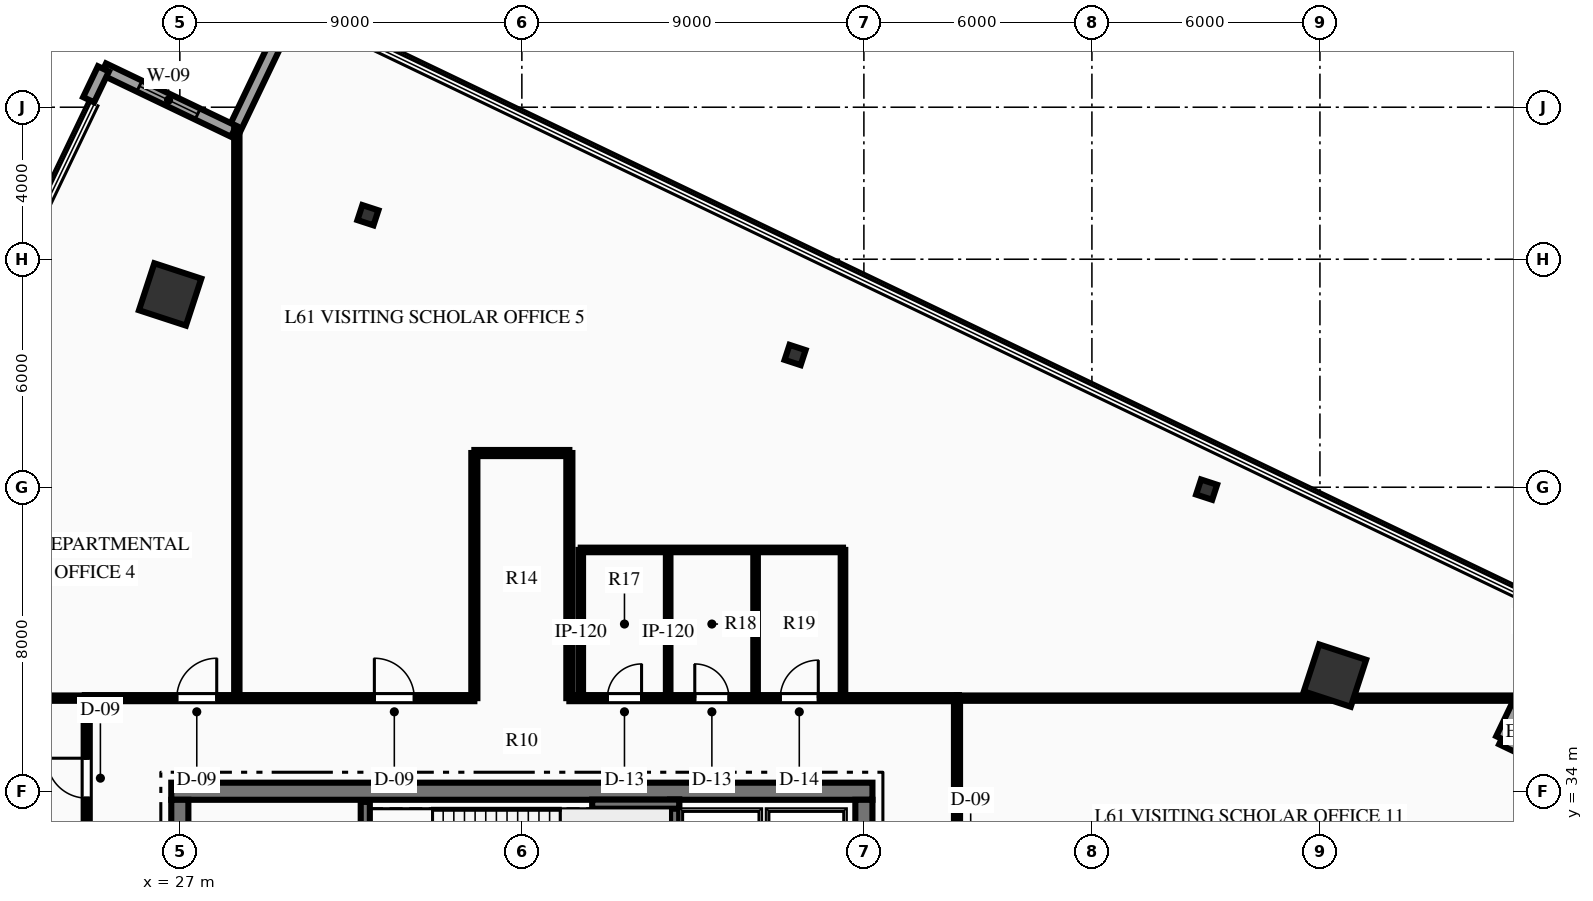
"""IFC4 building model, lengths in metres.
Left out: names, types, materials, properties, quantities, classifications, styles, units other than length and angle.
Written with IfcOpenShell. Run it as: python <this file> out.ifc"""

import sys

from ifc_helpers import new_model, si_unit, direction, frame, frame_2d, origin, origin_2d, place, context, subcontext, project, spatial, rectangle, hollow_rectangle, i_section, extrude, element, fill, save


model = new_model("IFC4")
c1 = context("Model", 3, precision=1e-05, world=origin(), true_north=direction((0.0, 1.0)))
c2 = subcontext(c1, "Body", "Model", "MODEL_VIEW")
j1 = project(units=[si_unit("LENGTHUNIT", "METRE"), si_unit("PLANEANGLEUNIT", "RADIAN")], contexts=[c1])
p1 = place(None, origin())
s1 = spatial("IfcSite", under=j1, at=p1, CompositionType="ELEMENT")
p2 = place(p1, origin())
s2 = spatial("IfcBuilding", under=s1, at=p2, CompositionType="ELEMENT")
p3 = place(p2, frame((0.0, 0.0, 244.2)))
s3 = spatial("IfcBuildingStorey", under=s2, at=p3, CompositionType="ELEMENT", Elevation=244.2)
p4 = place(p3, frame((26.775, 34.0, 0.0), z_axis=(0.0, 0.0, 1.0), x_axis=(1.0, 0.0, 0.0)))
e1 = element("IfcWall", 1, at=p4, inside=s3, PredefinedType="SHEAR", context=c2, shape_type="SweptSolid", body=[
    extrude(rectangle(XDim=18.45, YDim=0.45, at=frame_2d((9.225, 0.0))), origin(), (0.0, 0.0, 1.0), 4.5),
])
p5 = place(p3, frame((27.0, 18.225, 0.0), z_axis=(0.0, 0.0, 1.0), x_axis=(0.0, 1.0, 0.0)))
e2 = element("IfcWall", 2, at=p5, inside=s3, PredefinedType="SHEAR", context=c2, shape_type="SweptSolid", body=[
    extrude(rectangle(XDim=15.55, YDim=0.45, at=frame_2d((7.775, 0.0))), origin(), (0.0, 0.0, 1.0), 4.5),
])
p6 = place(p5, frame((10.015, 0.0, 0.0)))
e3 = element("IfcOpeningElement", 3, at=p6, cuts=e2, PredefinedType="OPENING", context=c2, shape_type="SweptSolid", body=[
    extrude(rectangle(XDim=1.4, YDim=2.2, at=frame_2d((0.7, 1.1))), frame((0.0, 0.235, 0.0), z_axis=(0.0, -1.0, 0.0), x_axis=(1.0, 0.0, 0.0)), (0.0, 0.0, 1.0), 0.47),
])
p7 = place(p3, frame((45.0, 18.225, 0.0), z_axis=(0.0, 0.0, 1.0), x_axis=(0.0, 1.0, 0.0)))
e4 = element("IfcWall", 4, at=p7, inside=s3, PredefinedType="SHEAR", context=c2, shape_type="SweptSolid", body=[
    extrude(rectangle(XDim=15.55, YDim=0.45, at=frame_2d((7.775, 0.0))), origin(), (0.0, 0.0, 1.0), 4.5),
])
p8 = place(p7, frame((10.015, 0.0, 0.0)))
e5 = element("IfcOpeningElement", 5, at=p8, cuts=e4, PredefinedType="OPENING", context=c2, shape_type="SweptSolid", body=[
    extrude(rectangle(XDim=1.4, YDim=2.2, at=frame_2d((0.7, 1.1))), frame((0.0, 0.235, 0.0), z_axis=(0.0, -1.0, 0.0), x_axis=(1.0, 0.0, 0.0)), (0.0, 0.0, 1.0), 0.47),
])
p9 = place(p3, frame((31.88, 29.93, 0.0), z_axis=(0.0, 0.0, 1.0), x_axis=(0.0, 1.0, 0.0)))
e6 = element("IfcWall", 6, at=p9, inside=s3, PredefinedType="SHEAR", context=c2, shape_type="SweptSolid", body=[
    extrude(rectangle(XDim=3.79, YDim=0.24, at=frame_2d((1.895, 0.0))), origin(), (0.0, 0.0, 1.0), 4.5),
])
p10 = place(p3, frame((40.02, 29.93, 0.0), z_axis=(0.0, 0.0, 1.0), x_axis=(0.0, 1.0, 0.0)))
e7 = element("IfcWall", 7, at=p10, inside=s3, PredefinedType="SHEAR", context=c2, shape_type="SweptSolid", body=[
    extrude(rectangle(XDim=3.85, YDim=0.24, at=frame_2d((1.925, 0.0))), origin(), (0.0, 0.0, 1.0), 4.5),
])
p11 = place(p3, frame((37.85, 33.66, 0.0), z_axis=(0.0, 0.0, 1.0), x_axis=(1.0, 0.0, 0.0)))
e8 = element("IfcWall", 8, at=p11, inside=s3, PredefinedType="SHEAR", context=c2, shape_type="SweptSolid", body=[
    extrude(rectangle(XDim=2.29, YDim=0.24, at=frame_2d((1.145, 0.0))), origin(), (0.0, 0.0, 1.0), 4.5),
])
for number, where, z_axis, x_axis in (
    (9, (57.396, 37.043, 0.0), (0.0, 0.0, 1.0), (0.311, 0.95, 0.0)),
    (10, (26.745, 47.073, 0.0), (0.0, 0.0, 1.0), (0.311, 0.95, 0.0)),
):
    element("IfcColumn", number, at=place(p3, frame(where, z_axis=z_axis, x_axis=x_axis)), inside=s3, PredefinedType="COLUMN", context=c2, shape_type="SweptSolid", body=[
        extrude(hollow_rectangle(XDim=1.3, YDim=1.3, WallThickness=0.06, at=origin_2d()), origin(), (0.0, 0.0, 1.0), 4.5),
    ])
for number, where, z_axis, x_axis in (
    (11, (54.018, 41.937, 0.0), (0.0, 0.0, 1.0), (0.311, 0.95, 0.0)),
    (12, (43.19, 45.48, 0.0), (0.0, 0.0, 1.0), (0.311, 0.95, 0.0)),
    (13, (31.949, 49.158, 0.0), (0.0, 0.0, 1.0), (0.311, 0.95, 0.0)),
):
    element("IfcColumn", number, at=place(p3, frame(where, z_axis=z_axis, x_axis=x_axis)), inside=s3, PredefinedType="COLUMN", context=c2, shape_type="SweptSolid", body=[
        extrude(i_section(OverallWidth=0.416, OverallDepth=0.445, WebThickness=0.039, FlangeThickness=0.063, at=origin_2d()), origin(), (0.0, 0.0, 1.0), 4.5),
    ])
p12 = place(p3, frame((61.784, 35.38, 0.0), z_axis=(0.0, 0.0, 1.0), x_axis=(0.901805596144, -0.432141952099, 0.0)))
e14 = element("IfcWall", 14, at=p12, inside=s3, PredefinedType="STANDARD", context=c2, shape_type="SweptSolid", body=[
    extrude(rectangle(XDim=3.8, YDim=0.32, at=frame_2d((1.9, 0.0))), origin(), (0.0, 0.0, 1.0), 4.23),
])
for number, where, z_axis, x_axis in (
    (15, (63.426, 38.807, 0.0), (0.0, 0.0, 1.0), (-0.432, -0.902, 0.0)),
    (16, (28.416, 51.367, 0.0), (0.0, 0.0, 1.0), (0.432, 0.902, 0.0)),
):
    element("IfcWall", number, at=place(p3, frame(where, z_axis=z_axis, x_axis=x_axis)), inside=s3, PredefinedType="STANDARD", context=c2, shape_type="SweptSolid", body=[
        extrude(rectangle(XDim=3.8, YDim=0.32, at=frame_2d((1.9, 0.0))), origin(), (0.0, 0.0, 1.0), 4.23),
    ])
p13 = place(p3, frame((24.989, 53.009, 0.0), z_axis=(0.0, 0.0, 1.0), x_axis=(0.901817593476, -0.432116914848, 0.0)))
e17 = element("IfcWall", 17, at=p13, inside=s3, PredefinedType="STANDARD", context=c2, shape_type="SweptSolid", body=[
    extrude(rectangle(XDim=3.8, YDim=0.32, at=frame_2d((1.9, 0.0))), origin(), (0.0, 0.0, 1.0), 4.23),
])
p14 = place(p13, frame((1.05, 0.0, 0.75)))
e18 = element("IfcOpeningElement", 18, at=p14, cuts=e17, PredefinedType="OPENING", context=c2, shape_type="SweptSolid", body=[
    extrude(rectangle(XDim=1.7, YDim=2.5, at=frame_2d((0.85, 1.25))), frame((0.0, 0.17, 0.0), z_axis=(0.0, -1.0, 0.0), x_axis=(1.0, 0.0, 0.0)), (0.0, 0.0, 1.0), 0.34),
])
p15 = place(p3, frame((24.6, 52.198, 0.0), z_axis=(0.0, 0.0, 1.0), x_axis=(0.432175339096, 0.901789596457, 0.0)))
e19 = element("IfcWall", 19, at=p15, inside=s3, PredefinedType="STANDARD", context=c2, shape_type="SweptSolid", body=[
    extrude(rectangle(XDim=0.9, YDim=0.32, at=frame_2d((0.45, 0.0))), origin(), (0.0, 0.0, 1.0), 4.23),
])
p16 = place(p3, frame((24.5, 36.45, 0.0), z_axis=(0.0, 0.0, 1.0), x_axis=(1.0, 0.0, 0.0)))
e20 = element("IfcWall", 20, at=p16, inside=s3, PredefinedType="PARTITIONING", context=c2, shape_type="SweptSolid", body=[
    extrude(rectangle(XDim=10.25, YDim=0.16, at=frame_2d((5.125, 0.0))), origin(), (0.0, 0.0, 1.0), 4.23),
])
p17 = place(p16, frame((2.421, 0.0, 0.0)))
e21 = element("IfcOpeningElement", 21, at=p17, cuts=e20, PredefinedType="OPENING", context=c2, shape_type="SweptSolid", body=[
    extrude(rectangle(XDim=1.05, YDim=2.15, at=frame_2d((0.525, 1.075))), frame((0.0, 0.09, 0.0), z_axis=(0.0, -1.0, 0.0), x_axis=(1.0, 0.0, 0.0)), (0.0, 0.0, 1.0), 0.18),
])
p18 = place(p16, frame((7.619, 0.0, 0.0)))
e22 = element("IfcOpeningElement", 22, at=p18, cuts=e20, PredefinedType="OPENING", context=c2, shape_type="SweptSolid", body=[
    extrude(rectangle(XDim=1.05, YDim=2.15, at=frame_2d((0.525, 1.075))), frame((0.0, 0.09, 0.0), z_axis=(0.0, -1.0, 0.0), x_axis=(1.0, 0.0, 0.0)), (0.0, 0.0, 1.0), 0.18),
])
p19 = place(p3, frame((37.25, 36.45, 0.0), z_axis=(0.0, 0.0, 1.0), x_axis=(1.0, 0.0, 0.0)))
e23 = element("IfcWall", 23, at=p19, inside=s3, PredefinedType="PARTITIONING", context=c2, shape_type="SweptSolid", body=[
    extrude(rectangle(XDim=10.25, YDim=0.16, at=frame_2d((5.125, 0.0))), origin(), (0.0, 0.0, 1.0), 4.23),
])
p20 = place(p19, frame((1.0, 0.0, 0.0)))
e24 = element("IfcOpeningElement", 24, at=p20, cuts=e23, PredefinedType="OPENING", context=c2, shape_type="SweptSolid", body=[
    extrude(rectangle(XDim=0.9, YDim=2.15, at=frame_2d((0.45, 1.075))), frame((0.0, 0.09, 0.0), z_axis=(0.0, -1.0, 0.0), x_axis=(1.0, 0.0, 0.0)), (0.0, 0.0, 1.0), 0.18),
])
p21 = place(p19, frame((3.3, 0.0, 0.0)))
e25 = element("IfcOpeningElement", 25, at=p21, cuts=e23, PredefinedType="OPENING", context=c2, shape_type="SweptSolid", body=[
    extrude(rectangle(XDim=0.9, YDim=2.15, at=frame_2d((0.45, 1.075))), frame((0.0, 0.09, 0.0), z_axis=(0.0, -1.0, 0.0), x_axis=(1.0, 0.0, 0.0)), (0.0, 0.0, 1.0), 0.18),
])
p22 = place(p19, frame((5.55, 0.0, 0.0)))
e26 = element("IfcOpeningElement", 26, at=p22, cuts=e23, PredefinedType="OPENING", context=c2, shape_type="SweptSolid", body=[
    extrude(rectangle(XDim=1.0, YDim=2.15, at=frame_2d((0.5, 1.075))), frame((0.0, 0.09, 0.0), z_axis=(0.0, -1.0, 0.0), x_axis=(1.0, 0.0, 0.0)), (0.0, 0.0, 1.0), 0.18),
])
p23 = place(p3, frame((24.55, 27.25, 0.0), z_axis=(0.0, 0.0, 1.0), x_axis=(0.0, 1.0, 0.0)))
e27 = element("IfcWall", 27, at=p23, inside=s3, PredefinedType="PARTITIONING", context=c2, shape_type="SweptSolid", body=[
    extrude(rectangle(XDim=9.2, YDim=0.16, at=frame_2d((4.6, 0.0))), origin(), (0.0, 0.0, 1.0), 4.23),
])
p24 = place(p23, frame((6.569, 0.0, 0.0)))
e28 = element("IfcOpeningElement", 28, at=p24, cuts=e27, PredefinedType="OPENING", context=c2, shape_type="SweptSolid", body=[
    extrude(rectangle(XDim=1.05, YDim=2.15, at=frame_2d((0.525, 1.075))), frame((0.0, 0.09, 0.0), z_axis=(0.0, -1.0, 0.0), x_axis=(1.0, 0.0, 0.0)), (0.0, 0.0, 1.0), 0.18),
])
p25 = place(p3, frame((47.45, 27.25, 0.0), z_axis=(0.0, 0.0, 1.0), x_axis=(0.0, 1.0, 0.0)))
e29 = element("IfcWall", 29, at=p25, inside=s3, PredefinedType="PARTITIONING", context=c2, shape_type="SweptSolid", body=[
    extrude(rectangle(XDim=9.2, YDim=0.16, at=frame_2d((4.6, 0.0))), origin(), (0.0, 0.0, 1.0), 4.23),
])
p26 = place(p25, frame((4.199, 0.0, 0.0)))
e30 = element("IfcOpeningElement", 30, at=p26, cuts=e29, PredefinedType="OPENING", context=c2, shape_type="SweptSolid", body=[
    extrude(rectangle(XDim=1.05, YDim=2.15, at=frame_2d((0.525, 1.075))), frame((0.0, 0.09, 0.0), z_axis=(0.0, -1.0, 0.0), x_axis=(1.0, 0.0, 0.0)), (0.0, 0.0, 1.0), 0.18),
])
for number, where, z_axis, x_axis in (
    (31, (34.75, 36.45, 0.0), (0.0, 0.0, 1.0), (0.0, 1.0, 0.0)),
    (32, (37.25, 36.45, 0.0), (0.0, 0.0, 1.0), (0.0, 1.0, 0.0)),
):
    element("IfcWall", number, at=place(p3, frame(where, z_axis=z_axis, x_axis=x_axis)), inside=s3, PredefinedType="PARTITIONING", context=c2, shape_type="SweptSolid", body=[
        extrude(rectangle(XDim=6.45, YDim=0.16, at=frame_2d((3.225, 0.0))), origin(), (0.0, 0.0, 1.0), 4.23),
    ])
p27 = place(p3, frame((34.75, 42.9, 0.0), z_axis=(0.0, 0.0, 1.0), x_axis=(1.0, 0.0, 0.0)))
e33 = element("IfcWall", 33, at=p27, inside=s3, PredefinedType="PARTITIONING", context=c2, shape_type="SweptSolid", body=[
    extrude(rectangle(XDim=2.5, YDim=0.16, at=frame_2d((1.25, 0.0))), origin(), (0.0, 0.0, 1.0), 4.23),
])
for number, where, z_axis, x_axis in (
    (34, (37.55, 36.45, 0.0), (0.0, 0.0, 1.0), (0.0, 1.0, 0.0)),
    (35, (39.85, 36.45, 0.0), (0.0, 0.0, 1.0), (0.0, 1.0, 0.0)),
    (36, (42.15, 36.45, 0.0), (0.0, 0.0, 1.0), (0.0, 1.0, 0.0)),
    (37, (44.45, 36.45, 0.0), (0.0, 0.0, 1.0), (0.0, 1.0, 0.0)),
):
    element("IfcWall", number, at=place(p3, frame(where, z_axis=z_axis, x_axis=x_axis)), inside=s3, PredefinedType="PARTITIONING", context=c2, shape_type="SweptSolid", body=[
        extrude(rectangle(XDim=3.9, YDim=0.12, at=frame_2d((1.95, 0.0))), origin(), (0.0, 0.0, 1.0), 4.23),
    ])
p28 = place(p3, frame((37.55, 40.35, 0.0), z_axis=(0.0, 0.0, 1.0), x_axis=(1.0, 0.0, 0.0)))
e38 = element("IfcWall", 38, at=p28, inside=s3, PredefinedType="PARTITIONING", context=c2, shape_type="SweptSolid", body=[
    extrude(rectangle(XDim=6.9, YDim=0.12, at=frame_2d((3.45, 0.0))), origin(), (0.0, 0.0, 1.0), 4.23),
])
p29 = place(p3, frame((17.1, 36.45, 0.0), z_axis=(0.0, 0.0, 1.0), x_axis=(1.0, 0.0, 0.0)))
e39 = element("IfcWall", 39, at=p29, inside=s3, PredefinedType="PARTITIONING", context=c2, shape_type="SweptSolid", body=[
    extrude(rectangle(XDim=7.45, YDim=0.14, at=frame_2d((3.725, 0.0))), origin(), (0.0, 0.0, 1.0), 4.23),
])
p30 = place(p3, frame((47.45, 36.45, 0.0), z_axis=(0.0, 0.0, 1.0), x_axis=(1.0, 0.0, 0.0)))
e40 = element("IfcWall", 40, at=p30, inside=s3, PredefinedType="PARTITIONING", context=c2, shape_type="SweptSolid", body=[
    extrude(rectangle(XDim=14.802, YDim=0.14, at=frame_2d((7.401, 0.0))), origin(), (0.0, 0.0, 1.0), 3.608),
])
p31 = place(p3, frame((28.5, 36.45, 0.0), z_axis=(0.0, 0.0, 1.0), x_axis=(0.0, 1.0, 0.0)))
e41 = element("IfcWall", 41, at=p31, inside=s3, PredefinedType="PARTITIONING", context=c2, shape_type="SweptSolid", body=[
    extrude(rectangle(XDim=14.999, YDim=0.14, at=frame_2d((7.5, 0.0))), origin(), (0.0, 0.0, 1.0), 4.23),
])
p32 = place(p14, origin())
e42 = element("IfcWindow", 42, at=p32, inside=s3, PartitioningType="SINGLE_PANEL", PredefinedType="WINDOW", context=c2, shape_type="SweptSolid", body=[
    extrude(rectangle(XDim=1.7, YDim=2.5, at=frame_2d((0.85, 1.25))), frame((0.0, 0.03, 0.0), z_axis=(0.0, -1.0, 0.0), x_axis=(1.0, 0.0, 0.0)), (0.0, 0.0, 1.0), 0.06),
])
fill(e18, e42)
p33 = place(p20, origin())
e43 = element("IfcDoor", 43, at=p33, inside=s3, OperationType="SINGLE_SWING_RIGHT", PredefinedType="DOOR", context=c2, shape_type="SweptSolid", body=[
    extrude(rectangle(XDim=0.9, YDim=2.15, at=frame_2d((0.45, 1.075))), frame((0.0, 0.025, 0.0), z_axis=(0.0, -1.0, 0.0), x_axis=(1.0, 0.0, 0.0)), (0.0, 0.0, 1.0), 0.05),
])
fill(e24, e43)
p34 = place(p21, origin())
e44 = element("IfcDoor", 44, at=p34, inside=s3, OperationType="SINGLE_SWING_LEFT", PredefinedType="DOOR", context=c2, shape_type="SweptSolid", body=[
    extrude(rectangle(XDim=0.9, YDim=2.15, at=frame_2d((0.45, 1.075))), frame((0.0, 0.025, 0.0), z_axis=(0.0, -1.0, 0.0), x_axis=(1.0, 0.0, 0.0)), (0.0, 0.0, 1.0), 0.05),
])
fill(e25, e44)
p35 = place(p22, origin())
e45 = element("IfcDoor", 45, at=p35, inside=s3, OperationType="SINGLE_SWING_RIGHT", PredefinedType="DOOR", context=c2, shape_type="SweptSolid", body=[
    extrude(rectangle(XDim=1.0, YDim=2.15, at=frame_2d((0.5, 1.075))), frame((0.0, 0.025, 0.0), z_axis=(0.0, -1.0, 0.0), x_axis=(1.0, 0.0, 0.0)), (0.0, 0.0, 1.0), 0.05),
])
fill(e26, e45)
p36 = place(p17, origin())
e46 = element("IfcDoor", 46, at=p36, inside=s3, OperationType="SINGLE_SWING_RIGHT", PredefinedType="DOOR", context=c2, shape_type="SweptSolid", body=[
    extrude(rectangle(XDim=1.05, YDim=2.15, at=frame_2d((0.525, 1.075))), frame((0.0, 0.025, 0.0), z_axis=(0.0, -1.0, 0.0), x_axis=(1.0, 0.0, 0.0)), (0.0, 0.0, 1.0), 0.05),
])
fill(e21, e46)
p37 = place(p18, origin())
e47 = element("IfcDoor", 47, at=p37, inside=s3, OperationType="SINGLE_SWING_LEFT", PredefinedType="DOOR", context=c2, shape_type="SweptSolid", body=[
    extrude(rectangle(XDim=1.05, YDim=2.15, at=frame_2d((0.525, 1.075))), frame((0.0, 0.025, 0.0), z_axis=(0.0, -1.0, 0.0), x_axis=(1.0, 0.0, 0.0)), (0.0, 0.0, 1.0), 0.05),
])
fill(e22, e47)
p38 = place(p24, origin())
e48 = element("IfcDoor", 48, at=p38, inside=s3, OperationType="SINGLE_SWING_RIGHT", PredefinedType="DOOR", context=c2, shape_type="SweptSolid", body=[
    extrude(rectangle(XDim=1.05, YDim=2.15, at=frame_2d((0.525, 1.075))), frame((0.0, 0.025, 0.0), z_axis=(0.0, -1.0, 0.0), x_axis=(1.0, 0.0, 0.0)), (0.0, 0.0, 1.0), 0.05),
])
fill(e28, e48)
save(model, sys.argv[1])
